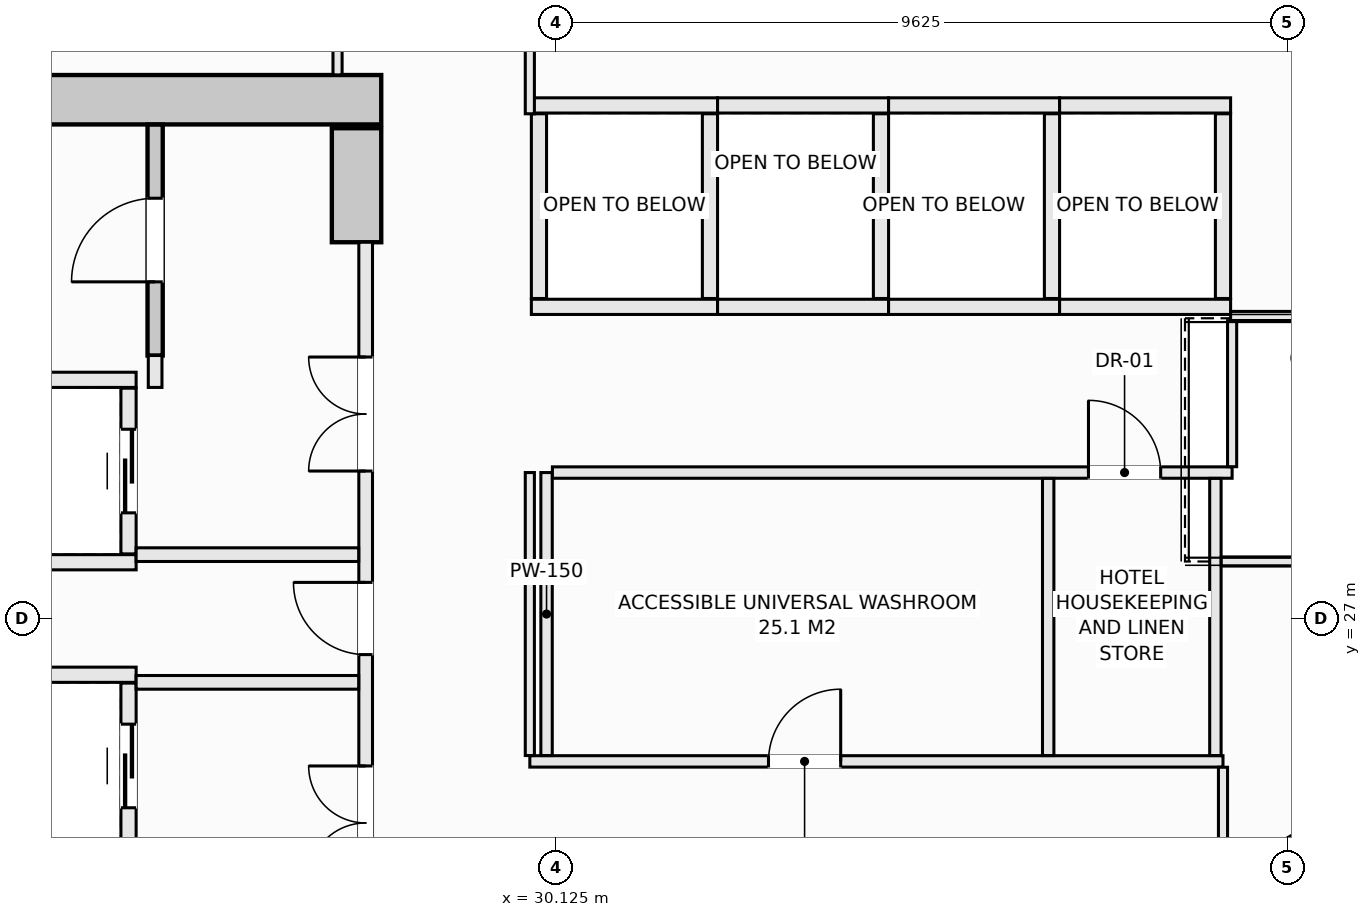
"""IFC4 building model, lengths in metres.
Left out: names, types, materials, properties, quantities, classifications, styles, units other than length and angle.
Written with IfcOpenShell. Run it as: python <this file> out.ifc"""

import sys

from ifc_helpers import new_model, si_unit, direction, frame, frame_2d, origin, place, context, subcontext, project, spatial, rectangle, extrude, element, fill, save


model = new_model("IFC4")
c1 = context("Model", 3, precision=1e-05, world=origin(), true_north=direction((0.0, 1.0)))
c2 = subcontext(c1, "Body", "Model", "MODEL_VIEW")
j1 = project(units=[si_unit("LENGTHUNIT", "METRE"), si_unit("PLANEANGLEUNIT", "RADIAN")], contexts=[c1])
p1 = place(None, origin())
s1 = spatial("IfcSite", under=j1, at=p1, CompositionType="ELEMENT")
p2 = place(p1, origin())
s2 = spatial("IfcBuilding", under=s1, at=p2, CompositionType="ELEMENT")
p3 = place(p2, frame((0.0, 0.0, 105.3)))
s3 = spatial("IfcBuildingStorey", under=s2, at=p3, CompositionType="ELEMENT", Elevation=105.3)
p4 = place(p3, frame((14.175, 33.825, -0.27), z_axis=(0.0, 0.0, 1.0), x_axis=(1.0, 0.0, 0.0)))
e1 = element("IfcWall", 1, at=p4, inside=s3, PredefinedType="SHEAR", context=c2, shape_type="SweptSolid", body=[
    extrude(rectangle(XDim=13.65, YDim=0.65, at=frame_2d((6.825, 0.0))), origin(), (0.0, 0.0, 1.0), 3.4),
])
p5 = place(p3, frame((27.5, 31.95, -0.27), z_axis=(0.0, 0.0, 1.0), x_axis=(0.0, 1.0, 0.0)))
e2 = element("IfcWall", 2, at=p5, inside=s3, PredefinedType="SHEAR", context=c2, shape_type="SweptSolid", body=[
    extrude(rectangle(XDim=1.5, YDim=0.65, at=frame_2d((0.75, 0.0))), origin(), (0.0, 0.0, 1.0), 3.4),
])
p6 = place(p3, frame((24.85, 30.46, -0.27), z_axis=(0.0, 0.0, 1.0), x_axis=(0.0, 1.0, 0.0)))
e3 = element("IfcWall", 3, at=p6, inside=s3, PredefinedType="SHEAR", context=c2, shape_type="SweptSolid", body=[
    extrude(rectangle(XDim=3.038, YDim=0.2, at=frame_2d((1.519, 0.0))), origin(), (0.0, 0.0, 1.0), 3.4),
])
p7 = place(p6, frame((0.969, 0.0, 0.27)))
e4 = element("IfcOpeningElement", 4, at=p7, cuts=e3, PredefinedType="OPENING", context=c2, shape_type="SweptSolid", body=[
    extrude(rectangle(XDim=1.1, YDim=2.15, at=frame_2d((0.55, 1.075))), frame((0.0, 0.11, 0.0), z_axis=(0.0, -1.0, 0.0), x_axis=(1.0, 0.0, 0.0)), (0.0, 0.0, 1.0), 0.22),
])
for number, where, z_axis, x_axis in (
    (5, (22.15, 30.14, 0.0), (0.0, 0.0, 1.0), (1.0, 0.0, 0.0)),
    (6, (22.15, 27.74, 0.0), (0.0, 0.0, 1.0), (1.0, 0.0, 0.0)),
):
    element("IfcWall", number, at=place(p3, frame(where, z_axis=z_axis, x_axis=x_axis)), inside=s3, PredefinedType="SOLIDWALL", context=c2, shape_type="SweptSolid", body=[
        extrude(rectangle(XDim=2.45, YDim=0.2, at=frame_2d((1.225, 0.0))), origin(), (0.0, 0.0, 1.0), 3.13),
    ])
p8 = place(p3, frame((24.5, 27.85, 0.0), z_axis=(0.0, 0.0, 1.0), x_axis=(0.0, 1.0, 0.0)))
e7 = element("IfcWall", 7, at=p8, inside=s3, PredefinedType="SOLIDWALL", context=c2, shape_type="SweptSolid", body=[
    extrude(rectangle(XDim=2.18, YDim=0.2, at=frame_2d((1.09, 0.0))), origin(), (0.0, 0.0, 1.0), 3.13),
])
p9 = place(p8, frame((0.54, 0.0, 0.0)))
e8 = element("IfcOpeningElement", 8, at=p9, cuts=e7, PredefinedType="OPENING", context=c2, shape_type="SweptSolid", body=[
    extrude(rectangle(XDim=1.1, YDim=2.2, at=frame_2d((0.55, 1.1))), frame((0.0, 0.11, 0.0), z_axis=(0.0, -1.0, 0.0), x_axis=(1.0, 0.0, 0.0)), (0.0, 0.0, 1.0), 0.22),
])
p10 = place(p3, frame((22.15, 26.26, 0.0), z_axis=(0.0, 0.0, 1.0), x_axis=(1.0, 0.0, 0.0)))
e9 = element("IfcWall", 9, at=p10, inside=s3, PredefinedType="SOLIDWALL", context=c2, shape_type="SweptSolid", body=[
    extrude(rectangle(XDim=2.45, YDim=0.2, at=frame_2d((1.225, 0.0))), origin(), (0.0, 0.0, 1.0), 3.13),
])
p11 = place(p3, frame((24.5, 23.97, 0.0), z_axis=(0.0, 0.0, 1.0), x_axis=(0.0, 1.0, 0.0)))
e10 = element("IfcWall", 10, at=p11, inside=s3, PredefinedType="SOLIDWALL", context=c2, shape_type="SweptSolid", body=[
    extrude(rectangle(XDim=2.18, YDim=0.2, at=frame_2d((1.09, 0.0))), origin(), (0.0, 0.0, 1.0), 3.13),
])
p12 = place(p11, frame((0.54, 0.0, 0.0)))
e11 = element("IfcOpeningElement", 11, at=p12, cuts=e10, PredefinedType="OPENING", context=c2, shape_type="SweptSolid", body=[
    extrude(rectangle(XDim=1.1, YDim=2.2, at=frame_2d((0.55, 1.1))), frame((0.0, 0.11, 0.0), z_axis=(0.0, -1.0, 0.0), x_axis=(1.0, 0.0, 0.0)), (0.0, 0.0, 1.0), 0.22),
])
for number, where, z_axis, x_axis in (
    (12, (29.8, 33.75, 0.0), (0.0, 0.0, 1.0), (1.0, 0.0, 0.0)),
    (13, (29.8, 31.1, 0.0), (0.0, 0.0, 1.0), (1.0, 0.0, 0.0)),
):
    element("IfcWall", number, at=place(p3, frame(where, z_axis=z_axis, x_axis=x_axis)), inside=s3, PredefinedType="SOLIDWALL", context=c2, shape_type="SweptSolid", body=[
        extrude(rectangle(XDim=2.45, YDim=0.2, at=frame_2d((1.225, 0.0))), origin(), (0.0, 0.0, 1.0), 3.13),
    ])
for number, where, z_axis, x_axis in (
    (14, (29.9, 31.21, 0.0), (0.0, 0.0, 1.0), (0.0, 1.0, 0.0)),
    (15, (32.15, 31.21, 0.0), (0.0, 0.0, 1.0), (0.0, 1.0, 0.0)),
):
    element("IfcWall", number, at=place(p3, frame(where, z_axis=z_axis, x_axis=x_axis)), inside=s3, PredefinedType="SOLIDWALL", context=c2, shape_type="SweptSolid", body=[
        extrude(rectangle(XDim=2.43, YDim=0.2, at=frame_2d((1.215, 0.0))), origin(), (0.0, 0.0, 1.0), 3.13),
    ])
for number, where, z_axis, x_axis in (
    (16, (32.25, 33.75, 0.0), (0.0, 0.0, 1.0), (1.0, 0.0, 0.0)),
    (17, (32.25, 31.1, 0.0), (0.0, 0.0, 1.0), (1.0, 0.0, 0.0)),
):
    element("IfcWall", number, at=place(p3, frame(where, z_axis=z_axis, x_axis=x_axis)), inside=s3, PredefinedType="SOLIDWALL", context=c2, shape_type="SweptSolid", body=[
        extrude(rectangle(XDim=2.25, YDim=0.2, at=frame_2d((1.125, 0.0))), origin(), (0.0, 0.0, 1.0), 3.13),
    ])
p13 = place(p3, frame((34.4, 31.21, 0.0), z_axis=(0.0, 0.0, 1.0), x_axis=(0.0, 1.0, 0.0)))
e18 = element("IfcWall", 18, at=p13, inside=s3, PredefinedType="SOLIDWALL", context=c2, shape_type="SweptSolid", body=[
    extrude(rectangle(XDim=2.43, YDim=0.2, at=frame_2d((1.215, 0.0))), origin(), (0.0, 0.0, 1.0), 3.13),
])
for number, where, z_axis, x_axis in (
    (19, (34.5, 33.75, 0.0), (0.0, 0.0, 1.0), (1.0, 0.0, 0.0)),
    (20, (34.5, 31.1, 0.0), (0.0, 0.0, 1.0), (1.0, 0.0, 0.0)),
):
    element("IfcWall", number, at=place(p3, frame(where, z_axis=z_axis, x_axis=x_axis)), inside=s3, PredefinedType="SOLIDWALL", context=c2, shape_type="SweptSolid", body=[
        extrude(rectangle(XDim=2.25, YDim=0.2, at=frame_2d((1.125, 0.0))), origin(), (0.0, 0.0, 1.0), 3.13),
    ])
p14 = place(p3, frame((36.65, 31.21, 0.0), z_axis=(0.0, 0.0, 1.0), x_axis=(0.0, 1.0, 0.0)))
e21 = element("IfcWall", 21, at=p14, inside=s3, PredefinedType="SOLIDWALL", context=c2, shape_type="SweptSolid", body=[
    extrude(rectangle(XDim=2.43, YDim=0.2, at=frame_2d((1.215, 0.0))), origin(), (0.0, 0.0, 1.0), 3.13),
])
for number, where, z_axis, x_axis in (
    (22, (36.75, 33.75, 0.0), (0.0, 0.0, 1.0), (1.0, 0.0, 0.0)),
    (23, (36.75, 31.1, 0.0), (0.0, 0.0, 1.0), (1.0, 0.0, 0.0)),
):
    element("IfcWall", number, at=place(p3, frame(where, z_axis=z_axis, x_axis=x_axis)), inside=s3, PredefinedType="SOLIDWALL", context=c2, shape_type="SweptSolid", body=[
        extrude(rectangle(XDim=2.25, YDim=0.2, at=frame_2d((1.125, 0.0))), origin(), (0.0, 0.0, 1.0), 3.13),
    ])
p15 = place(p3, frame((38.9, 31.21, 0.0), z_axis=(0.0, 0.0, 1.0), x_axis=(0.0, 1.0, 0.0)))
e24 = element("IfcWall", 24, at=p15, inside=s3, PredefinedType="SOLIDWALL", context=c2, shape_type="SweptSolid", body=[
    extrude(rectangle(XDim=2.43, YDim=0.2, at=frame_2d((1.215, 0.0))), origin(), (0.0, 0.0, 1.0), 3.13),
])
p16 = place(p3, frame((24.85, 30.04, 0.0), z_axis=(0.0, 0.0, 1.0), x_axis=(0.0, 1.0, 0.0)))
e25 = element("IfcWall", 25, at=p16, inside=s3, PredefinedType="SOLIDWALL", context=c2, shape_type="SweptSolid", body=[
    extrude(rectangle(XDim=0.42, YDim=0.18, at=frame_2d((0.21, 0.0))), origin(), (0.0, 0.0, 1.0), 3.13),
])
p17 = place(p3, frame((27.62, 22.05, 0.0), z_axis=(0.0, 0.0, 1.0), x_axis=(0.0, 1.0, 0.0)))
e26 = element("IfcWall", 26, at=p17, inside=s3, PredefinedType="SOLIDWALL", context=c2, shape_type="SweptSolid", body=[
    extrude(rectangle(XDim=9.9, YDim=0.18, at=frame_2d((4.95, 0.0))), origin(), (0.0, 0.0, 1.0), 3.13),
])
p18 = place(p17, frame((4.475, 0.0, 0.0)))
e27 = element("IfcOpeningElement", 27, at=p18, cuts=e26, PredefinedType="OPENING", context=c2, shape_type="SweptSolid", body=[
    extrude(rectangle(XDim=0.95, YDim=2.1, at=frame_2d((0.475, 1.05))), frame((0.0, 0.1, 0.0), z_axis=(0.0, -1.0, 0.0), x_axis=(1.0, 0.0, 0.0)), (0.0, 0.0, 1.0), 0.2),
])
p19 = place(p17, frame((6.89, 0.0, 0.0)))
e28 = element("IfcOpeningElement", 28, at=p19, cuts=e26, PredefinedType="OPENING", context=c2, shape_type="SweptSolid", body=[
    extrude(rectangle(XDim=1.5, YDim=2.2, at=frame_2d((0.75, 1.1))), frame((0.0, 0.1, 0.0), z_axis=(0.0, -1.0, 0.0), x_axis=(1.0, 0.0, 0.0)), (0.0, 0.0, 1.0), 0.2),
])
p20 = place(p17, frame((1.51, 0.0, 0.0)))
e29 = element("IfcOpeningElement", 29, at=p20, cuts=e26, PredefinedType="OPENING", context=c2, shape_type="SweptSolid", body=[
    extrude(rectangle(XDim=1.5, YDim=2.2, at=frame_2d((0.75, 1.1))), frame((0.0, 0.1, 0.0), z_axis=(0.0, -1.0, 0.0), x_axis=(1.0, 0.0, 0.0)), (0.0, 0.0, 1.0), 0.2),
])
for number, where, z_axis, x_axis in (
    (30, (24.6, 27.84, 0.0), (0.0, 0.0, 1.0), (1.0, 0.0, 0.0)),
    (31, (24.6, 26.16, 0.0), (0.0, 0.0, 1.0), (1.0, 0.0, 0.0)),
):
    element("IfcWall", number, at=place(p3, frame(where, z_axis=z_axis, x_axis=x_axis)), inside=s3, PredefinedType="SOLIDWALL", context=c2, shape_type="SweptSolid", body=[
        extrude(rectangle(XDim=2.928, YDim=0.18, at=frame_2d((1.464, 0.0))), origin(), (0.0, 0.0, 1.0), 3.13),
    ])
p21 = place(p3, frame((29.78, 25.12, 0.0), z_axis=(0.0, 0.0, 1.0), x_axis=(1.0, 0.0, 0.0)))
e32 = element("IfcWall", 32, at=p21, inside=s3, PredefinedType="PARTITIONING", context=c2, shape_type="SweptSolid", body=[
    extrude(rectangle(XDim=9.12, YDim=0.15, at=frame_2d((4.56, 0.0))), origin(), (0.0, 0.0, 1.0), 3.13),
])
p22 = place(p21, frame((3.14, 0.0, 0.0)))
e33 = element("IfcOpeningElement", 33, at=p22, cuts=e32, PredefinedType="OPENING", context=c2, shape_type="SweptSolid", body=[
    extrude(rectangle(XDim=0.95, YDim=2.1, at=frame_2d((0.475, 1.05))), frame((0.0, 0.085, 0.0), z_axis=(0.0, -1.0, 0.0), x_axis=(1.0, 0.0, 0.0)), (0.0, 0.0, 1.0), 0.17),
])
p23 = place(p3, frame((30.0, 25.197, 0.0), z_axis=(0.0, 0.0, 1.0), x_axis=(0.0, 1.0, 0.0)))
e34 = element("IfcWall", 34, at=p23, inside=s3, PredefinedType="PARTITIONING", context=c2, shape_type="SweptSolid", body=[
    extrude(rectangle(XDim=3.723, YDim=0.15, at=frame_2d((1.861, 0.0))), origin(), (0.0, 0.0, 1.0), 3.13),
])
p24 = place(p3, frame((30.077, 28.92, 0.0), z_axis=(0.0, 0.0, 1.0), x_axis=(1.0, 0.0, 0.0)))
e35 = element("IfcWall", 35, at=p24, inside=s3, PredefinedType="PARTITIONING", context=c2, shape_type="SweptSolid", body=[
    extrude(rectangle(XDim=8.943, YDim=0.15, at=frame_2d((4.472, 0.0))), origin(), (0.0, 0.0, 1.0), 3.13),
])
p25 = place(p24, frame((7.053, 0.0, 0.0)))
e36 = element("IfcOpeningElement", 36, at=p25, cuts=e35, PredefinedType="OPENING", context=c2, shape_type="SweptSolid", body=[
    extrude(rectangle(XDim=0.95, YDim=2.1, at=frame_2d((0.475, 1.05))), frame((0.0, 0.085, 0.0), z_axis=(0.0, -1.0, 0.0), x_axis=(1.0, 0.0, 0.0)), (0.0, 0.0, 1.0), 0.17),
])
for number, where, z_axis, x_axis in (
    (37, (36.6, 25.197, 0.0), (0.0, 0.0, 1.0), (0.0, 1.0, 0.0)),
    (38, (38.8, 25.197, 0.0), (0.0, 0.0, 1.0), (0.0, 1.0, 0.0)),
):
    element("IfcWall", number, at=place(p3, frame(where, z_axis=z_axis, x_axis=x_axis)), inside=s3, PredefinedType="PARTITIONING", context=c2, shape_type="SweptSolid", body=[
        extrude(rectangle(XDim=3.646, YDim=0.15, at=frame_2d((1.823, 0.0))), origin(), (0.0, 0.0, 1.0), 3.13),
    ])
p26 = place(p3, frame((27.25, 34.152, 0.0), z_axis=(0.0, 0.0, 1.0), x_axis=(0.0, 1.0, 0.0)))
e39 = element("IfcWall", 39, at=p26, inside=s3, PredefinedType="PARTITIONING", context=c2, shape_type="SweptSolid", body=[
    extrude(rectangle(XDim=0.806, YDim=0.12, at=frame_2d((0.403, 0.0))), origin(), (0.0, 0.0, 1.0), 3.13),
])
p27 = place(p3, frame((29.78, 25.197, 0.0), z_axis=(0.0, 0.0, 1.0), x_axis=(0.0, 1.0, 0.0)))
e40 = element("IfcWall", 40, at=p27, inside=s3, PredefinedType="PARTITIONING", context=c2, shape_type="SweptSolid", body=[
    extrude(rectangle(XDim=3.723, YDim=0.12, at=frame_2d((1.861, 0.0))), origin(), (0.0, 0.0, 1.0), 3.13),
])
p28 = place(p3, frame((29.78, 33.64, 0.0), z_axis=(0.0, 0.0, 1.0), x_axis=(0.0, 1.0, 0.0)))
e41 = element("IfcWall", 41, at=p28, inside=s3, PredefinedType="PARTITIONING", context=c2, shape_type="SweptSolid", body=[
    extrude(rectangle(XDim=4.798, YDim=0.12, at=frame_2d((2.399, 0.0))), origin(), (0.0, 0.0, 1.0), 3.13),
])
p29 = place(p28, frame((1.924, 0.0, 0.0)))
e42 = element("IfcOpeningElement", 42, at=p29, cuts=e41, PredefinedType="OPENING", context=c2, shape_type="SweptSolid", body=[
    extrude(rectangle(XDim=0.95, YDim=2.1, at=frame_2d((0.475, 1.05))), frame((0.0, 0.07, 0.0), z_axis=(0.0, -1.0, 0.0), x_axis=(1.0, 0.0, 0.0)), (0.0, 0.0, 1.0), 0.14),
])
p30 = place(p3, frame((39.0, 30.98, 0.0), z_axis=(0.0, 0.0, 1.0), x_axis=(1.0, 0.0, 0.0)))
e43 = element("IfcWall", 43, at=p30, inside=s3, PredefinedType="PARTITIONING", context=c2, shape_type="SweptSolid", body=[
    extrude(rectangle(XDim=4.8, YDim=0.12, at=frame_2d((2.4, 0.0))), origin(), (0.0, 0.0, 1.0), 3.13),
])
p31 = place(p3, frame((39.02, 28.997, 0.0), z_axis=(0.0, 0.0, 1.0), x_axis=(0.0, 1.0, 0.0)))
e44 = element("IfcWall", 44, at=p31, inside=s3, PredefinedType="PARTITIONING", context=c2, shape_type="SweptSolid", body=[
    extrude(rectangle(XDim=1.921, YDim=0.12, at=frame_2d((0.96, 0.0))), origin(), (0.0, 0.0, 1.0), 3.13),
])
p32 = place(p3, frame((38.9, 23.02, 0.0), z_axis=(0.0, 0.0, 1.0), x_axis=(0.0, 1.0, 0.0)))
e45 = element("IfcWall", 45, at=p32, inside=s3, PredefinedType="PARTITIONING", context=c2, shape_type="SweptSolid", body=[
    extrude(rectangle(XDim=2.023, YDim=0.12, at=frame_2d((1.011, 0.0))), origin(), (0.0, 0.0, 1.0), 3.13),
])
p33 = place(p3, frame((38.962, 23.589, 0.0), z_axis=(0.0, 0.0, 1.0), x_axis=(0.864680370076, 0.502322463768, 0.0)))
e46 = element("IfcWall", 46, at=p33, inside=s3, PredefinedType="PARTITIONING", context=c2, shape_type="SweptSolid", body=[
    extrude(rectangle(XDim=16.634, YDim=0.12, at=frame_2d((8.317, 0.0))), origin(), (0.0, 0.0, 1.0), 2.505),
])
p34 = place(p3, frame((38.877, 27.75, 0.0), z_axis=(0.0, 0.0, 1.0), x_axis=(1.0, 0.0, 0.0)))
e47 = element("IfcWall", 47, at=p34, inside=s3, PredefinedType="PARTITIONING", context=c2, shape_type="SweptSolid", body=[
    extrude(rectangle(XDim=4.923, YDim=0.12, at=frame_2d((2.461, 0.0))), origin(), (0.0, 0.0, 1.0), 3.13),
])
p35 = place(p7, origin())
e48 = element("IfcDoor", 48, at=p35, inside=s3, OperationType="SINGLE_SWING_LEFT", PredefinedType="DOOR", context=c2, shape_type="SweptSolid", body=[
    extrude(rectangle(XDim=1.1, YDim=2.15, at=frame_2d((0.55, 1.075))), frame((0.0, 0.025, 0.0), z_axis=(0.0, -1.0, 0.0), x_axis=(1.0, 0.0, 0.0)), (0.0, 0.0, 1.0), 0.05),
])
fill(e4, e48)
p36 = place(p9, origin())
e49 = element("IfcDoor", 49, at=p36, inside=s3, OperationType="SLIDING_TO_LEFT", PredefinedType="DOOR", context=c2, shape_type="SweptSolid", body=[
    extrude(rectangle(XDim=1.1, YDim=2.2, at=frame_2d((0.55, 1.1))), frame((0.0, 0.025, 0.0), z_axis=(0.0, -1.0, 0.0), x_axis=(1.0, 0.0, 0.0)), (0.0, 0.0, 1.0), 0.05),
])
fill(e8, e49)
p37 = place(p12, origin())
e50 = element("IfcDoor", 50, at=p37, inside=s3, OperationType="SLIDING_TO_LEFT", PredefinedType="DOOR", context=c2, shape_type="SweptSolid", body=[
    extrude(rectangle(XDim=1.1, YDim=2.2, at=frame_2d((0.55, 1.1))), frame((0.0, 0.025, 0.0), z_axis=(0.0, -1.0, 0.0), x_axis=(1.0, 0.0, 0.0)), (0.0, 0.0, 1.0), 0.05),
])
fill(e11, e50)
p38 = place(p18, origin())
e51 = element("IfcDoor", 51, at=p38, inside=s3, OperationType="SINGLE_SWING_RIGHT", PredefinedType="DOOR", context=c2, shape_type="SweptSolid", body=[
    extrude(rectangle(XDim=0.95, YDim=2.1, at=frame_2d((0.475, 1.05))), frame((0.0, 0.025, 0.0), z_axis=(0.0, -1.0, 0.0), x_axis=(1.0, 0.0, 0.0)), (0.0, 0.0, 1.0), 0.05),
])
fill(e27, e51)
p39 = place(p19, origin())
e52 = element("IfcDoor", 52, at=p39, inside=s3, OperationType="DOUBLE_DOOR_SINGLE_SWING", PredefinedType="DOOR", context=c2, shape_type="SweptSolid", body=[
    extrude(rectangle(XDim=1.5, YDim=2.2, at=frame_2d((0.75, 1.1))), frame((0.0, 0.025, 0.0), z_axis=(0.0, -1.0, 0.0), x_axis=(1.0, 0.0, 0.0)), (0.0, 0.0, 1.0), 0.05),
])
fill(e28, e52)
p40 = place(p20, origin())
e53 = element("IfcDoor", 53, at=p40, inside=s3, OperationType="DOUBLE_DOOR_SINGLE_SWING", PredefinedType="DOOR", context=c2, shape_type="SweptSolid", body=[
    extrude(rectangle(XDim=1.5, YDim=2.2, at=frame_2d((0.75, 1.1))), frame((0.0, 0.025, 0.0), z_axis=(0.0, -1.0, 0.0), x_axis=(1.0, 0.0, 0.0)), (0.0, 0.0, 1.0), 0.05),
])
fill(e29, e53)
p41 = place(p22, origin())
e54 = element("IfcDoor", 54, at=p41, inside=s3, OperationType="SINGLE_SWING_RIGHT", PredefinedType="DOOR", context=c2, shape_type="SweptSolid", body=[
    extrude(rectangle(XDim=0.95, YDim=2.1, at=frame_2d((0.475, 1.05))), frame((0.0, 0.025, 0.0), z_axis=(0.0, -1.0, 0.0), x_axis=(1.0, 0.0, 0.0)), (0.0, 0.0, 1.0), 0.05),
])
fill(e33, e54)
p42 = place(p25, origin())
e55 = element("IfcDoor", 55, at=p42, inside=s3, OperationType="SINGLE_SWING_LEFT", PredefinedType="DOOR", context=c2, shape_type="SweptSolid", body=[
    extrude(rectangle(XDim=0.95, YDim=2.1, at=frame_2d((0.475, 1.05))), frame((0.0, 0.025, 0.0), z_axis=(0.0, -1.0, 0.0), x_axis=(1.0, 0.0, 0.0)), (0.0, 0.0, 1.0), 0.05),
])
fill(e36, e55)
save(model, sys.argv[1])
